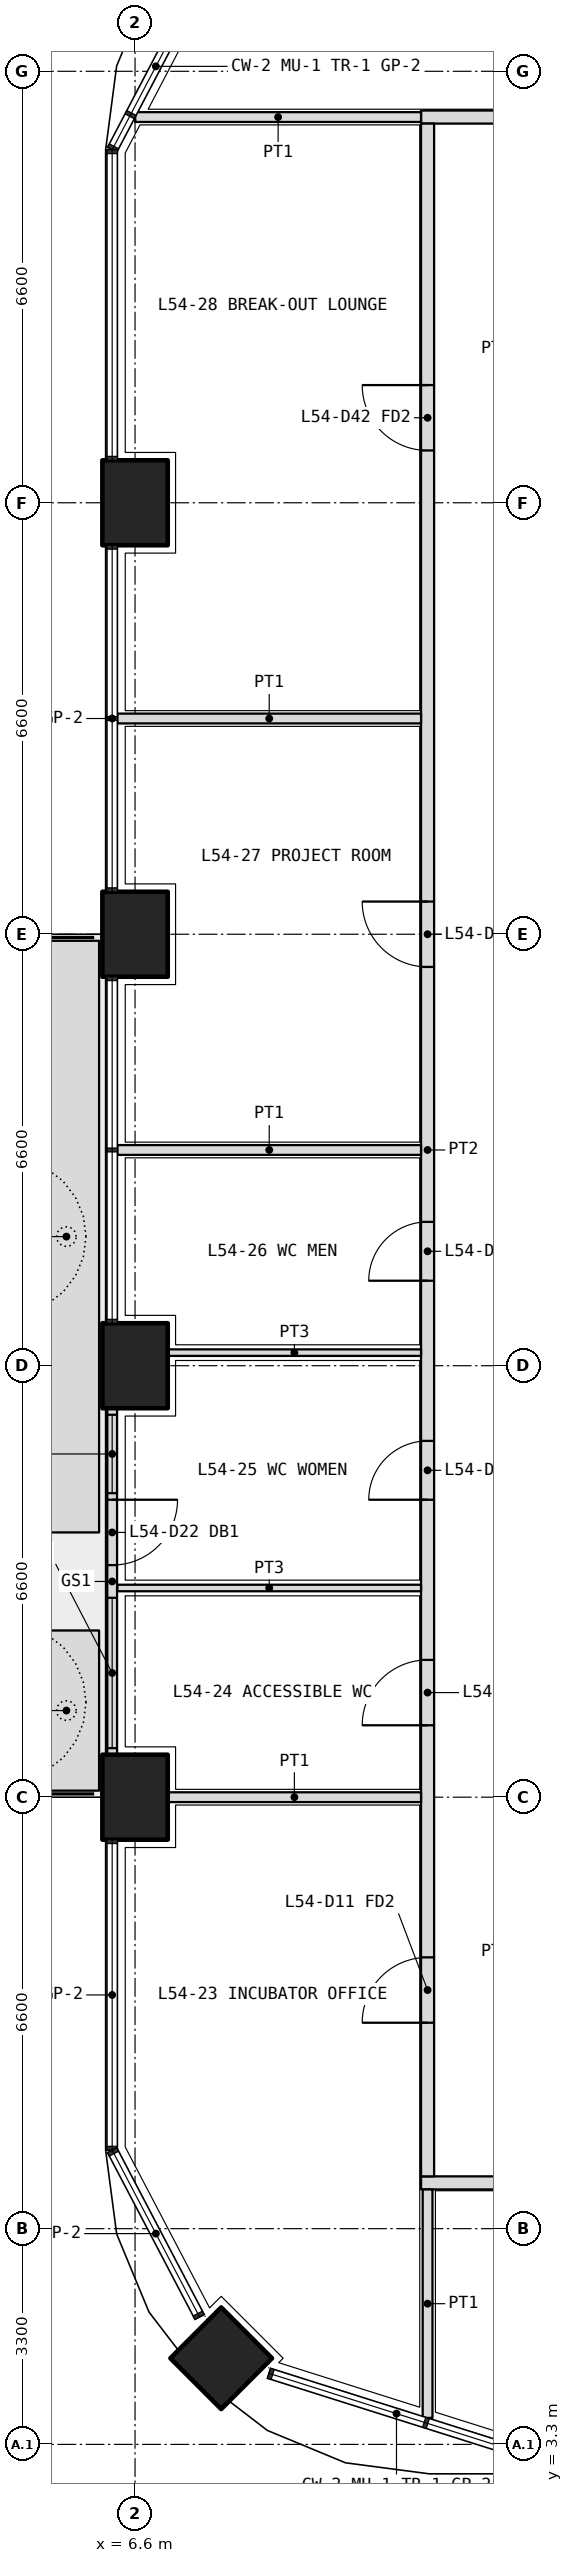
"""IFC4 building model, lengths in metres.
Left out: names, types, materials, properties, quantities, classifications, styles, units other than length and angle.
Written with IfcOpenShell. Run it as: python <this file> out.ifc"""

import sys

from ifc_helpers import new_model, si_unit, direction, frame, frame_2d, origin, origin_2d, place, context, subcontext, project, spatial, polyline, rectangle, outline, extrude, element, fill, save


model = new_model("IFC4")
c1 = context("Model", 3, precision=1e-05, world=origin(), true_north=direction((0.0, 1.0)))
c2 = subcontext(c1, "Body", "Model", "MODEL_VIEW")
j1 = project(units=[si_unit("LENGTHUNIT", "METRE"), si_unit("PLANEANGLEUNIT", "RADIAN")], contexts=[c1])
p1 = place(None, origin())
s1 = spatial("IfcSite", under=j1, at=p1, CompositionType="ELEMENT")
p2 = place(p1, origin())
s2 = spatial("IfcBuilding", under=s1, at=p2, CompositionType="ELEMENT")
p3 = place(p2, frame((0.0, 0.0, 237.6)))
s3 = spatial("IfcBuildingStorey", under=s2, at=p3, CompositionType="ELEMENT", Elevation=237.6)
p4 = place(p3, frame((7.918, 4.618, 0.0), z_axis=(0.0, 0.0, 1.0), x_axis=(0.707106781187, 0.707106781187, 0.0)))
e1 = element("IfcColumn", 1, at=p4, inside=s3, PredefinedType="COLUMN", context=c2, shape_type="SweptSolid", body=[
    extrude(rectangle(XDim=1.1, YDim=1.1, at=origin_2d()), origin(), (0.0, 0.0, 1.0), 4.2),
])
for number, where, z_axis, x_axis in (
    (2, (6.6, 13.2, 0.0), (0.0, 0.0, 1.0), (0.0, 1.0, 0.0)),
    (3, (6.6, 19.8, 0.0), (0.0, 0.0, 1.0), (0.0, 1.0, 0.0)),
    (4, (6.6, 26.4, 0.0), (0.0, 0.0, 1.0), (0.0, 1.0, 0.0)),
    (5, (6.6, 33.0, 0.0), (0.0, 0.0, 1.0), (0.0, 1.0, 0.0)),
):
    element("IfcColumn", number, at=place(p3, frame(where, z_axis=z_axis, x_axis=x_axis)), inside=s3, PredefinedType="COLUMN", context=c2, shape_type="SweptSolid", body=[
        extrude(rectangle(XDim=1.3, YDim=1.0, at=origin_2d()), origin(), (0.0, 0.0, 1.0), 4.2),
    ])
p5 = place(p3, origin())
e6 = element("IfcWall", 6, at=p5, inside=s3, PredefinedType="USERDEFINED", context=c2, shape_type="SweptSolid", body=[
    extrude(outline(polyline([(5.05, 13.3), (6.05, 13.3), (6.05, 15.75), (5.05, 15.75), (5.05, 13.3)]), holes=[polyline([(5.2, 13.45), (5.9, 13.45), (5.9, 15.6), (5.2, 15.6), (5.2, 13.45)])]), origin(), (0.0, 0.0, 1.0), 1.05),
])
p6 = place(p3, origin())
e7 = element("IfcWall", 7, at=p6, inside=s3, PredefinedType="USERDEFINED", context=c2, shape_type="SweptSolid", body=[
    extrude(outline(polyline([(5.05, 17.25), (6.05, 17.25), (6.05, 26.3), (5.05, 26.3), (5.05, 17.25)]), holes=[polyline([(5.2, 17.4), (5.9, 17.4), (5.9, 26.15), (5.2, 26.15), (5.2, 17.4)])]), origin(), (0.0, 0.0, 1.0), 1.05),
])
p7 = place(p3, frame((6.25, 19.15, 0.0), z_axis=(0.0, 0.0, 1.0), x_axis=(0.0, -1.0, 0.0)))
e8 = element("IfcWall", 8, at=p7, inside=s3, PredefinedType="SOLIDWALL", context=c2, shape_type="SweptSolid", body=[
    extrude(rectangle(XDim=5.3, YDim=0.15, at=frame_2d((2.65, 0.0))), origin(), (0.0, 0.0, 1.0), 2.7),
])
p8 = place(p7, frame((1.4, 0.0, 0.0)))
e9 = element("IfcOpeningElement", 9, at=p8, cuts=e8, PredefinedType="OPENING", context=c2, shape_type="SweptSolid", body=[
    extrude(rectangle(XDim=1.0, YDim=2.4, at=frame_2d((0.5, 1.2))), frame((0.0, 0.085, 0.0), z_axis=(0.0, -1.0, 0.0), x_axis=(1.0, 0.0, 0.0)), (0.0, 0.0, 1.0), 0.17),
])
p9 = place(p7, frame((0.1, 0.0, 0.1)))
e10 = element("IfcOpeningElement", 10, at=p9, cuts=e8, PredefinedType="OPENING", context=c2, shape_type="SweptSolid", body=[
    extrude(rectangle(XDim=1.2, YDim=2.3, at=frame_2d((0.6, 1.15))), frame((0.0, 0.085, 0.0), z_axis=(0.0, -1.0, 0.0), x_axis=(1.0, 0.0, 0.0)), (0.0, 0.0, 1.0), 0.17),
])
p10 = place(p7, frame((2.9, 0.0, 0.1)))
e11 = element("IfcOpeningElement", 11, at=p10, cuts=e8, PredefinedType="OPENING", context=c2, shape_type="SweptSolid", body=[
    extrude(rectangle(XDim=2.3, YDim=2.3, at=frame_2d((1.15, 1.15))), frame((0.0, 0.085, 0.0), z_axis=(0.0, -1.0, 0.0), x_axis=(1.0, 0.0, 0.0)), (0.0, 0.0, 1.0), 0.17),
])
p11 = place(p3, frame((10.975, 7.3, 0.0), z_axis=(0.0, 0.0, 1.0), x_axis=(1.0, 0.0, 0.0)))
e12 = element("IfcWall", 12, at=p11, inside=s3, PredefinedType="PARTITIONING", context=c2, shape_type="SweptSolid", body=[
    extrude(rectangle(XDim=30.85, YDim=0.2, at=frame_2d((15.425, 0.0))), origin(), (0.0, 0.0, 1.0), 3.0),
])
p12 = place(p11, frame((2.312, 0.0, 0.0)))
e13 = element("IfcOpeningElement", 13, at=p12, cuts=e12, PredefinedType="OPENING", context=c2, shape_type="SweptSolid", body=[
    extrude(rectangle(XDim=1.0, YDim=2.1, at=frame_2d((0.5, 1.05))), frame((0.0, 0.11, 0.0), z_axis=(0.0, -1.0, 0.0), x_axis=(1.0, 0.0, 0.0)), (0.0, 0.0, 1.0), 0.22),
])
p13 = place(p11, frame((13.275, 0.0, 0.0)))
e14 = element("IfcOpeningElement", 14, at=p13, cuts=e12, PredefinedType="OPENING", context=c2, shape_type="SweptSolid", body=[
    extrude(rectangle(XDim=1.0, YDim=2.1, at=frame_2d((0.5, 1.05))), frame((0.0, 0.11, 0.0), z_axis=(0.0, -1.0, 0.0), x_axis=(1.0, 0.0, 0.0)), (0.0, 0.0, 1.0), 0.22),
])
p14 = place(p11, frame((23.625, 0.0, 0.0)))
e15 = element("IfcOpeningElement", 15, at=p14, cuts=e12, PredefinedType="OPENING", context=c2, shape_type="SweptSolid", body=[
    extrude(rectangle(XDim=1.0, YDim=2.1, at=frame_2d((0.5, 1.05))), frame((0.0, 0.11, 0.0), z_axis=(0.0, -1.0, 0.0), x_axis=(1.0, 0.0, 0.0)), (0.0, 0.0, 1.0), 0.22),
])
p15 = place(p11, frame((26.925, 0.0, 0.0)))
e16 = element("IfcOpeningElement", 16, at=p15, cuts=e12, PredefinedType="OPENING", context=c2, shape_type="SweptSolid", body=[
    extrude(rectangle(XDim=1.0, YDim=2.1, at=frame_2d((0.5, 1.05))), frame((0.0, 0.11, 0.0), z_axis=(0.0, -1.0, 0.0), x_axis=(1.0, 0.0, 0.0)), (0.0, 0.0, 1.0), 0.22),
])
p16 = place(p11, frame((29.188, 0.0, 0.0)))
e17 = element("IfcOpeningElement", 17, at=p16, cuts=e12, PredefinedType="OPENING", context=c2, shape_type="SweptSolid", body=[
    extrude(rectangle(XDim=1.0, YDim=2.1, at=frame_2d((0.5, 1.05))), frame((0.0, 0.11, 0.0), z_axis=(0.0, -1.0, 0.0), x_axis=(1.0, 0.0, 0.0)), (0.0, 0.0, 1.0), 0.22),
])
p17 = place(p3, frame((10.975, 38.9, 0.0), z_axis=(0.0, 0.0, 1.0), x_axis=(1.0, 0.0, 0.0)))
e18 = element("IfcWall", 18, at=p17, inside=s3, PredefinedType="PARTITIONING", context=c2, shape_type="SweptSolid", body=[
    extrude(rectangle(XDim=8.825, YDim=0.2, at=frame_2d((4.413, 0.0))), origin(), (0.0, 0.0, 1.0), 3.0),
])
p18 = place(p17, frame((3.962, 0.0, 0.0)))
e19 = element("IfcOpeningElement", 19, at=p18, cuts=e18, PredefinedType="OPENING", context=c2, shape_type="SweptSolid", body=[
    extrude(rectangle(XDim=1.0, YDim=2.1, at=frame_2d((0.5, 1.05))), frame((0.0, 0.11, 0.0), z_axis=(0.0, -1.0, 0.0), x_axis=(1.0, 0.0, 0.0)), (0.0, 0.0, 1.0), 0.22),
])
p19 = place(p3, frame((11.075, 7.4, 0.0), z_axis=(0.0, 0.0, 1.0), x_axis=(0.0, 1.0, 0.0)))
e20 = element("IfcWall", 20, at=p19, inside=s3, PredefinedType="PARTITIONING", context=c2, shape_type="SweptSolid", body=[
    extrude(rectangle(XDim=31.4, YDim=0.2, at=frame_2d((15.7, 0.0))), origin(), (0.0, 0.0, 1.0), 3.0),
])
p20 = place(p19, frame((2.35, 0.0, 0.0)))
e21 = element("IfcOpeningElement", 21, at=p20, cuts=e20, PredefinedType="OPENING", context=c2, shape_type="SweptSolid", body=[
    extrude(rectangle(XDim=1.0, YDim=2.1, at=frame_2d((0.5, 1.05))), frame((0.0, 0.11, 0.0), z_axis=(0.0, -1.0, 0.0), x_axis=(1.0, 0.0, 0.0)), (0.0, 0.0, 1.0), 0.22),
])
p21 = place(p19, frame((6.9, 0.0, 0.0)))
e22 = element("IfcOpeningElement", 22, at=p21, cuts=e20, PredefinedType="OPENING", context=c2, shape_type="SweptSolid", body=[
    extrude(rectangle(XDim=1.0, YDim=2.1, at=frame_2d((0.5, 1.05))), frame((0.0, 0.11, 0.0), z_axis=(0.0, -1.0, 0.0), x_axis=(1.0, 0.0, 0.0)), (0.0, 0.0, 1.0), 0.22),
])
p22 = place(p19, frame((10.35, 0.0, 0.0)))
e23 = element("IfcOpeningElement", 23, at=p22, cuts=e20, PredefinedType="OPENING", context=c2, shape_type="SweptSolid", body=[
    extrude(rectangle(XDim=0.9, YDim=2.1, at=frame_2d((0.45, 1.05))), frame((0.0, 0.11, 0.0), z_axis=(0.0, -1.0, 0.0), x_axis=(1.0, 0.0, 0.0)), (0.0, 0.0, 1.0), 0.22),
])
p23 = place(p19, frame((13.7, 0.0, 0.0)))
e24 = element("IfcOpeningElement", 24, at=p23, cuts=e20, PredefinedType="OPENING", context=c2, shape_type="SweptSolid", body=[
    extrude(rectangle(XDim=0.9, YDim=2.1, at=frame_2d((0.45, 1.05))), frame((0.0, 0.11, 0.0), z_axis=(0.0, -1.0, 0.0), x_axis=(1.0, 0.0, 0.0)), (0.0, 0.0, 1.0), 0.22),
])
p24 = place(p19, frame((18.5, 0.0, 0.0)))
e25 = element("IfcOpeningElement", 25, at=p24, cuts=e20, PredefinedType="OPENING", context=c2, shape_type="SweptSolid", body=[
    extrude(rectangle(XDim=1.0, YDim=2.1, at=frame_2d((0.5, 1.05))), frame((0.0, 0.11, 0.0), z_axis=(0.0, -1.0, 0.0), x_axis=(1.0, 0.0, 0.0)), (0.0, 0.0, 1.0), 0.22),
])
p25 = place(p19, frame((26.4, 0.0, 0.0)))
e26 = element("IfcOpeningElement", 26, at=p25, cuts=e20, PredefinedType="OPENING", context=c2, shape_type="SweptSolid", body=[
    extrude(rectangle(XDim=1.0, YDim=2.1, at=frame_2d((0.5, 1.05))), frame((0.0, 0.11, 0.0), z_axis=(0.0, -1.0, 0.0), x_axis=(1.0, 0.0, 0.0)), (0.0, 0.0, 1.0), 0.22),
])
p26 = place(p3, frame((11.075, 3.705, 0.0), z_axis=(0.0, 0.0, 1.0), x_axis=(0.0, 1.0, 0.0)))
e27 = element("IfcWall", 27, at=p26, inside=s3, PredefinedType="PARTITIONING", context=c2, shape_type="SweptSolid", body=[
    extrude(rectangle(XDim=3.495, YDim=0.15, at=frame_2d((1.748, 0.0))), origin(), (0.0, 0.0, 1.0), 2.7),
])
p27 = place(p3, frame((6.603, 38.9, 0.0), z_axis=(0.0, 0.0, 1.0), x_axis=(1.0, 0.0, 0.0)))
e28 = element("IfcWall", 28, at=p27, inside=s3, PredefinedType="PARTITIONING", context=c2, shape_type="SweptSolid", body=[
    extrude(rectangle(XDim=4.373, YDim=0.15, at=frame_2d((2.186, 0.0))), origin(), (0.0, 0.0, 1.0), 2.7),
])
p28 = place(p3, frame((6.33, 16.4, 0.0), z_axis=(0.0, 0.0, 1.0), x_axis=(1.0, 0.0, 0.0)))
e29 = element("IfcWall", 29, at=p28, inside=s3, PredefinedType="PARTITIONING", context=c2, shape_type="SweptSolid", body=[
    extrude(rectangle(XDim=4.645, YDim=0.1, at=frame_2d((2.323, 0.0))), origin(), (0.0, 0.0, 1.0), 2.7),
])
p29 = place(p3, frame((7.1, 20.0, 0.0), z_axis=(0.0, 0.0, 1.0), x_axis=(1.0, 0.0, 0.0)))
e30 = element("IfcWall", 30, at=p29, inside=s3, PredefinedType="PARTITIONING", context=c2, shape_type="SweptSolid", body=[
    extrude(rectangle(XDim=3.875, YDim=0.1, at=frame_2d((1.938, 0.0))), origin(), (0.0, 0.0, 1.0), 3.0),
])
p30 = place(p3, frame((6.33, 23.1, 0.0), z_axis=(0.0, 0.0, 1.0), x_axis=(1.0, 0.0, 0.0)))
e31 = element("IfcWall", 31, at=p30, inside=s3, PredefinedType="PARTITIONING", context=c2, shape_type="SweptSolid", body=[
    extrude(rectangle(XDim=4.645, YDim=0.15, at=frame_2d((2.323, 0.0))), origin(), (0.0, 0.0, 1.0), 2.7),
])
p31 = place(p3, frame((7.1, 13.2, 0.0), z_axis=(0.0, 0.0, 1.0), x_axis=(1.0, 0.0, 0.0)))
e32 = element("IfcWall", 32, at=p31, inside=s3, PredefinedType="PARTITIONING", context=c2, shape_type="SweptSolid", body=[
    extrude(rectangle(XDim=3.875, YDim=0.15, at=frame_2d((1.938, 0.0))), origin(), (0.0, 0.0, 1.0), 3.0),
])
p32 = place(p3, frame((6.33, 29.7, 0.0), z_axis=(0.0, 0.0, 1.0), x_axis=(1.0, 0.0, 0.0)))
e33 = element("IfcWall", 33, at=p32, inside=s3, PredefinedType="PARTITIONING", context=c2, shape_type="SweptSolid", body=[
    extrude(rectangle(XDim=4.645, YDim=0.15, at=frame_2d((2.323, 0.0))), origin(), (0.0, 0.0, 1.0), 2.7),
])
p33 = place(p8, origin())
e34 = element("IfcDoor", 34, at=p33, inside=s3, OperationType="SINGLE_SWING_LEFT", PredefinedType="DOOR", context=c2, shape_type="SweptSolid", body=[
    extrude(rectangle(XDim=1.0, YDim=2.4, at=frame_2d((0.5, 1.2))), frame((0.0, 0.025, 0.0), z_axis=(0.0, -1.0, 0.0), x_axis=(1.0, 0.0, 0.0)), (0.0, 0.0, 1.0), 0.05),
])
fill(e9, e34)
p34 = place(p9, origin())
e35 = element("IfcWindow", 35, at=p34, inside=s3, PartitioningType="SINGLE_PANEL", PredefinedType="WINDOW", context=c2, shape_type="SweptSolid", body=[
    extrude(rectangle(XDim=1.2, YDim=2.3, at=frame_2d((0.6, 1.15))), frame((0.0, 0.03, 0.0), z_axis=(0.0, -1.0, 0.0), x_axis=(1.0, 0.0, 0.0)), (0.0, 0.0, 1.0), 0.06),
])
fill(e10, e35)
p35 = place(p10, origin())
e36 = element("IfcWindow", 36, at=p35, inside=s3, PartitioningType="SINGLE_PANEL", PredefinedType="WINDOW", context=c2, shape_type="SweptSolid", body=[
    extrude(rectangle(XDim=2.3, YDim=2.3, at=frame_2d((1.15, 1.15))), frame((0.0, 0.03, 0.0), z_axis=(0.0, -1.0, 0.0), x_axis=(1.0, 0.0, 0.0)), (0.0, 0.0, 1.0), 0.06),
])
fill(e11, e36)
p36 = place(p20, origin())
e37 = element("IfcDoor", 37, at=p36, inside=s3, OperationType="SINGLE_SWING_LEFT", PredefinedType="DOOR", context=c2, shape_type="SweptSolid", body=[
    extrude(rectangle(XDim=1.0, YDim=2.1, at=frame_2d((0.5, 1.05))), frame((0.0, 0.025, 0.0), z_axis=(0.0, -1.0, 0.0), x_axis=(1.0, 0.0, 0.0)), (0.0, 0.0, 1.0), 0.05),
])
fill(e21, e37)
p37 = place(p21, origin())
e38 = element("IfcDoor", 38, at=p37, inside=s3, OperationType="SINGLE_SWING_LEFT", PredefinedType="DOOR", context=c2, shape_type="SweptSolid", body=[
    extrude(rectangle(XDim=1.0, YDim=2.1, at=frame_2d((0.5, 1.05))), frame((0.0, 0.025, 0.0), z_axis=(0.0, -1.0, 0.0), x_axis=(1.0, 0.0, 0.0)), (0.0, 0.0, 1.0), 0.05),
])
fill(e22, e38)
p38 = place(p22, origin())
e39 = element("IfcDoor", 39, at=p38, inside=s3, OperationType="SINGLE_SWING_LEFT", PredefinedType="DOOR", context=c2, shape_type="SweptSolid", body=[
    extrude(rectangle(XDim=0.9, YDim=2.1, at=frame_2d((0.45, 1.05))), frame((0.0, 0.025, 0.0), z_axis=(0.0, -1.0, 0.0), x_axis=(1.0, 0.0, 0.0)), (0.0, 0.0, 1.0), 0.05),
])
fill(e23, e39)
p39 = place(p23, origin())
e40 = element("IfcDoor", 40, at=p39, inside=s3, OperationType="SINGLE_SWING_LEFT", PredefinedType="DOOR", context=c2, shape_type="SweptSolid", body=[
    extrude(rectangle(XDim=0.9, YDim=2.1, at=frame_2d((0.45, 1.05))), frame((0.0, 0.025, 0.0), z_axis=(0.0, -1.0, 0.0), x_axis=(1.0, 0.0, 0.0)), (0.0, 0.0, 1.0), 0.05),
])
fill(e24, e40)
p40 = place(p24, origin())
e41 = element("IfcDoor", 41, at=p40, inside=s3, OperationType="SINGLE_SWING_RIGHT", PredefinedType="DOOR", context=c2, shape_type="SweptSolid", body=[
    extrude(rectangle(XDim=1.0, YDim=2.1, at=frame_2d((0.5, 1.05))), frame((0.0, 0.025, 0.0), z_axis=(0.0, -1.0, 0.0), x_axis=(1.0, 0.0, 0.0)), (0.0, 0.0, 1.0), 0.05),
])
fill(e25, e41)
p41 = place(p25, origin())
e42 = element("IfcDoor", 42, at=p41, inside=s3, OperationType="SINGLE_SWING_RIGHT", PredefinedType="DOOR", context=c2, shape_type="SweptSolid", body=[
    extrude(rectangle(XDim=1.0, YDim=2.1, at=frame_2d((0.5, 1.05))), frame((0.0, 0.025, 0.0), z_axis=(0.0, -1.0, 0.0), x_axis=(1.0, 0.0, 0.0)), (0.0, 0.0, 1.0), 0.05),
])
fill(e26, e42)
save(model, sys.argv[1])
